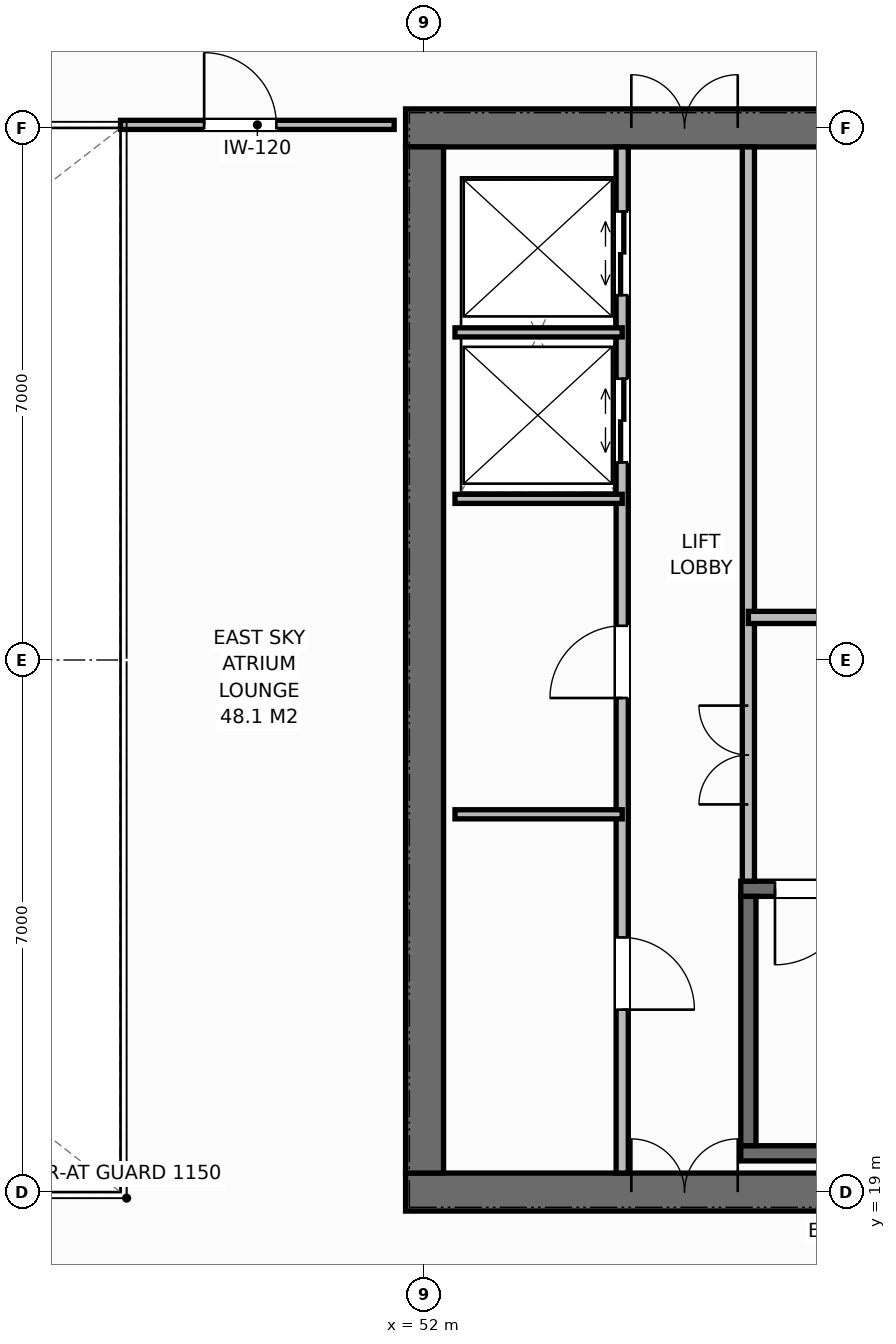
"""IFC4 building model, lengths in metres.
Left out: names, types, materials, properties, quantities, classifications, styles, units other than length and angle.
Written with IfcOpenShell. Run it as: python <this file> out.ifc"""

import sys

from ifc_helpers import new_model, si_unit, direction, frame, frame_2d, origin, place, context, subcontext, project, spatial, rectangle, extrude, element, fill, save


model = new_model("IFC4")
c1 = context("Model", 3, precision=1e-05, world=origin(), true_north=direction((0.0, 1.0)))
c2 = subcontext(c1, "Body", "Model", "MODEL_VIEW")
j1 = project(units=[si_unit("LENGTHUNIT", "METRE"), si_unit("PLANEANGLEUNIT", "RADIAN")], contexts=[c1])
p1 = place(None, origin())
s1 = spatial("IfcSite", under=j1, at=p1, CompositionType="ELEMENT")
p2 = place(p1, origin())
s2 = spatial("IfcBuilding", under=s1, at=p2, CompositionType="ELEMENT")
p3 = place(p2, frame((0.0, 0.0, 255.6)))
s3 = spatial("IfcBuildingStorey", under=s2, at=p3, CompositionType="ELEMENT", Elevation=255.6)
p4 = place(p3, frame((51.75, 19.0, 0.0), z_axis=(0.0, 0.0, 1.0), x_axis=(1.0, 0.0, 0.0)))
e1 = element("IfcWall", 1, at=p4, inside=s3, PredefinedType="SHEAR", context=c2, shape_type="SweptSolid", body=[
    extrude(rectangle(XDim=13.5, YDim=0.5, at=frame_2d((6.75, 0.0))), origin(), (0.0, 0.0, 1.0), 3.8),
])
p5 = place(p4, frame((2.97, 0.0, 0.0)))
e2 = element("IfcOpeningElement", 2, at=p5, cuts=e1, PredefinedType="OPENING", context=c2, shape_type="SweptSolid", body=[
    extrude(rectangle(XDim=1.4, YDim=2.2, at=frame_2d((0.7, 1.1))), frame((0.0, 0.26, 0.0), z_axis=(0.0, -1.0, 0.0), x_axis=(1.0, 0.0, 0.0)), (0.0, 0.0, 1.0), 0.52),
])
p6 = place(p3, frame((51.75, 33.0, 0.0), z_axis=(0.0, 0.0, 1.0), x_axis=(1.0, 0.0, 0.0)))
e3 = element("IfcWall", 3, at=p6, inside=s3, PredefinedType="SHEAR", context=c2, shape_type="SweptSolid", body=[
    extrude(rectangle(XDim=13.5, YDim=0.5, at=frame_2d((6.75, 0.0))), origin(), (0.0, 0.0, 1.0), 3.8),
])
p7 = place(p6, frame((2.97, 0.0, 0.0)))
e4 = element("IfcOpeningElement", 4, at=p7, cuts=e3, PredefinedType="OPENING", context=c2, shape_type="SweptSolid", body=[
    extrude(rectangle(XDim=1.4, YDim=2.2, at=frame_2d((0.7, 1.1))), frame((0.0, 0.26, 0.0), z_axis=(0.0, -1.0, 0.0), x_axis=(1.0, 0.0, 0.0)), (0.0, 0.0, 1.0), 0.52),
])
p8 = place(p6, frame((10.85, 0.0, 0.0)))
e5 = element("IfcOpeningElement", 5, at=p8, cuts=e3, PredefinedType="OPENING", context=c2, shape_type="SweptSolid", body=[
    extrude(rectangle(XDim=0.9, YDim=2.15, at=frame_2d((0.45, 1.075))), frame((0.0, 0.26, 0.0), z_axis=(0.0, -1.0, 0.0), x_axis=(1.0, 0.0, 0.0)), (0.0, 0.0, 1.0), 0.52),
])
p9 = place(p6, frame((6.25, 0.0, 0.0)))
e6 = element("IfcOpeningElement", 6, at=p9, cuts=e3, PredefinedType="OPENING", context=c2, shape_type="SweptSolid", body=[
    extrude(rectangle(XDim=0.95, YDim=2.15, at=frame_2d((0.475, 1.075))), frame((0.0, 0.26, 0.0), z_axis=(0.0, -1.0, 0.0), x_axis=(1.0, 0.0, 0.0)), (0.0, 0.0, 1.0), 0.52),
])
p10 = place(p6, frame((8.7, 0.0, 0.0)))
e7 = element("IfcOpeningElement", 7, at=p10, cuts=e3, PredefinedType="OPENING", context=c2, shape_type="SweptSolid", body=[
    extrude(rectangle(XDim=0.9, YDim=2.15, at=frame_2d((0.45, 1.075))), frame((0.0, 0.26, 0.0), z_axis=(0.0, -1.0, 0.0), x_axis=(1.0, 0.0, 0.0)), (0.0, 0.0, 1.0), 0.52),
])
p11 = place(p3, frame((52.0, 19.25, 0.0), z_axis=(0.0, 0.0, 1.0), x_axis=(0.0, 1.0, 0.0)))
e8 = element("IfcWall", 8, at=p11, inside=s3, PredefinedType="SHEAR", context=c2, shape_type="SweptSolid", body=[
    extrude(rectangle(XDim=13.5, YDim=0.5, at=frame_2d((6.75, 0.0))), origin(), (0.0, 0.0, 1.0), 3.8),
])
p12 = place(p3, frame((56.16, 19.51, 0.0), z_axis=(0.0, 0.0, 1.0), x_axis=(1.0, 0.0, 0.0)))
e9 = element("IfcWall", 9, at=p12, inside=s3, PredefinedType="SHEAR", context=c2, shape_type="SweptSolid", body=[
    extrude(rectangle(XDim=8.43, YDim=0.2, at=frame_2d((4.215, 0.0))), origin(), (0.0, 0.0, 1.0), 3.8),
])
p13 = place(p3, frame((56.16, 22.99, 0.0), z_axis=(0.0, 0.0, 1.0), x_axis=(1.0, 0.0, 0.0)))
e10 = element("IfcWall", 10, at=p13, inside=s3, PredefinedType="SHEAR", context=c2, shape_type="SweptSolid", body=[
    extrude(rectangle(XDim=8.43, YDim=0.2, at=frame_2d((4.215, 0.0))), origin(), (0.0, 0.0, 1.0), 3.8),
])
p14 = place(p13, frame((0.45, 0.0, 0.0)))
e11 = element("IfcOpeningElement", 11, at=p14, cuts=e10, PredefinedType="OPENING", context=c2, shape_type="SweptSolid", body=[
    extrude(rectangle(XDim=1.0, YDim=2.15, at=frame_2d((0.5, 1.075))), frame((0.0, 0.11, 0.0), z_axis=(0.0, -1.0, 0.0), x_axis=(1.0, 0.0, 0.0)), (0.0, 0.0, 1.0), 0.22),
])
p15 = place(p3, frame((56.26, 19.61, 0.0), z_axis=(0.0, 0.0, 1.0), x_axis=(0.0, 1.0, 0.0)))
e12 = element("IfcWall", 12, at=p15, inside=s3, PredefinedType="SHEAR", context=c2, shape_type="SweptSolid", body=[
    extrude(rectangle(XDim=3.28, YDim=0.2, at=frame_2d((1.64, 0.0))), origin(), (0.0, 0.0, 1.0), 3.8),
])
p16 = place(p3, frame((54.6, 19.25, 0.0), z_axis=(0.0, 0.0, 1.0), x_axis=(0.0, 1.0, 0.0)))
e13 = element("IfcWall", 13, at=p16, inside=s3, PredefinedType="STANDARD", context=c2, shape_type="SweptSolid", body=[
    extrude(rectangle(XDim=13.5, YDim=0.16, at=frame_2d((6.75, 0.0))), origin(), (0.0, 0.0, 1.0), 3.588),
])
p17 = place(p16, frame((2.15, 0.0, 0.0)))
e14 = element("IfcOpeningElement", 14, at=p17, cuts=e13, PredefinedType="OPENING", context=c2, shape_type="SweptSolid", body=[
    extrude(rectangle(XDim=0.95, YDim=2.15, at=frame_2d((0.475, 1.075))), frame((0.0, 0.09, 0.0), z_axis=(0.0, -1.0, 0.0), x_axis=(1.0, 0.0, 0.0)), (0.0, 0.0, 1.0), 0.18),
])
p18 = place(p16, frame((6.25, 0.0, 0.0)))
e15 = element("IfcOpeningElement", 15, at=p18, cuts=e13, PredefinedType="OPENING", context=c2, shape_type="SweptSolid", body=[
    extrude(rectangle(XDim=0.95, YDim=2.15, at=frame_2d((0.475, 1.075))), frame((0.0, 0.09, 0.0), z_axis=(0.0, -1.0, 0.0), x_axis=(1.0, 0.0, 0.0)), (0.0, 0.0, 1.0), 0.18),
])
p19 = place(p16, frame((9.35, 0.0, 0.0)))
e16 = element("IfcOpeningElement", 16, at=p19, cuts=e13, PredefinedType="OPENING", context=c2, shape_type="SweptSolid", body=[
    extrude(rectangle(XDim=1.1, YDim=2.2, at=frame_2d((0.55, 1.1))), frame((0.0, 0.09, 0.0), z_axis=(0.0, -1.0, 0.0), x_axis=(1.0, 0.0, 0.0)), (0.0, 0.0, 1.0), 0.18),
])
p20 = place(p16, frame((11.55, 0.0, 0.0)))
e17 = element("IfcOpeningElement", 17, at=p20, cuts=e13, PredefinedType="OPENING", context=c2, shape_type="SweptSolid", body=[
    extrude(rectangle(XDim=1.1, YDim=2.2, at=frame_2d((0.55, 1.1))), frame((0.0, 0.09, 0.0), z_axis=(0.0, -1.0, 0.0), x_axis=(1.0, 0.0, 0.0)), (0.0, 0.0, 1.0), 0.18),
])
p21 = place(p3, frame((56.26, 23.09, 0.0), z_axis=(0.0, 0.0, 1.0), x_axis=(0.0, 1.0, 0.0)))
e18 = element("IfcWall", 18, at=p21, inside=s3, PredefinedType="STANDARD", context=c2, shape_type="SweptSolid", body=[
    extrude(rectangle(XDim=9.66, YDim=0.16, at=frame_2d((4.83, 0.0))), origin(), (0.0, 0.0, 1.0), 3.588),
])
p22 = place(p21, frame((1.01, 0.0, 0.0)))
e19 = element("IfcOpeningElement", 19, at=p22, cuts=e18, PredefinedType="OPENING", context=c2, shape_type="SweptSolid", body=[
    extrude(rectangle(XDim=1.3, YDim=2.2, at=frame_2d((0.65, 1.1))), frame((0.0, 0.09, 0.0), z_axis=(0.0, -1.0, 0.0), x_axis=(1.0, 0.0, 0.0)), (0.0, 0.0, 1.0), 0.18),
])
for number, where, z_axis, x_axis in (
    (20, (52.4, 23.97, 0.0), (0.0, 0.0, 1.0), (1.0, 0.0, 0.0)),
    (21, (52.4, 28.12, 0.0), (0.0, 0.0, 1.0), (1.0, 0.0, 0.0)),
    (22, (52.4, 30.31, 0.0), (0.0, 0.0, 1.0), (1.0, 0.0, 0.0)),
):
    element("IfcWall", number, at=place(p3, frame(where, z_axis=z_axis, x_axis=x_axis)), inside=s3, PredefinedType="PARTITIONING", context=c2, shape_type="SweptSolid", body=[
        extrude(rectangle(XDim=2.2, YDim=0.12, at=frame_2d((1.1, 0.0))), origin(), (0.0, 0.0, 1.0), 3.588),
    ])
p23 = place(p3, frame((56.26, 26.56, 0.0), z_axis=(0.0, 0.0, 1.0), x_axis=(1.0, 0.0, 0.0)))
e23 = element("IfcWall", 23, at=p23, inside=s3, PredefinedType="STANDARD", context=c2, shape_type="SweptSolid", body=[
    extrude(rectangle(XDim=8.34, YDim=0.16, at=frame_2d((4.17, 0.0))), origin(), (0.0, 0.0, 1.0), 3.588),
])
p24 = place(p3, frame((48.0, 33.04, 0.0), z_axis=(0.0, 0.0, 1.0), x_axis=(1.0, 0.0, 0.0)))
e24 = element("IfcWall", 24, at=p24, inside=s3, PredefinedType="PARTITIONING", context=c2, shape_type="SweptSolid", body=[
    extrude(rectangle(XDim=3.6, YDim=0.12, at=frame_2d((1.8, 0.0))), origin(), (0.0, 0.0, 1.0), 3.328),
])
p25 = place(p24, frame((1.1, 0.0, 0.0)))
e25 = element("IfcOpeningElement", 25, at=p25, cuts=e24, PredefinedType="OPENING", context=c2, shape_type="SweptSolid", body=[
    extrude(rectangle(XDim=0.95, YDim=2.15, at=frame_2d((0.475, 1.075))), frame((0.0, 0.07, 0.0), z_axis=(0.0, -1.0, 0.0), x_axis=(1.0, 0.0, 0.0)), (0.0, 0.0, 1.0), 0.14),
])
p26 = place(p5, origin())
e26 = element("IfcDoor", 26, at=p26, inside=s3, OperationType="DOUBLE_DOOR_SINGLE_SWING", PredefinedType="DOOR", context=c2, shape_type="SweptSolid", body=[
    extrude(rectangle(XDim=1.4, YDim=2.2, at=frame_2d((0.7, 1.1))), frame((0.0, 0.075, 0.0), z_axis=(0.0, -1.0, 0.0), x_axis=(1.0, 0.0, 0.0)), (0.0, 0.0, 1.0), 0.05),
])
fill(e2, e26)
p27 = place(p7, origin())
e27 = element("IfcDoor", 27, at=p27, inside=s3, OperationType="DOUBLE_DOOR_SINGLE_SWING", PredefinedType="DOOR", context=c2, shape_type="SweptSolid", body=[
    extrude(rectangle(XDim=1.4, YDim=2.2, at=frame_2d((0.7, 1.1))), frame((0.0, -0.025, 0.0), z_axis=(0.0, -1.0, 0.0), x_axis=(1.0, 0.0, 0.0)), (0.0, 0.0, 1.0), 0.05),
])
fill(e4, e27)
p28 = place(p17, origin())
e28 = element("IfcDoor", 28, at=p28, inside=s3, OperationType="SINGLE_SWING_RIGHT", PredefinedType="DOOR", context=c2, shape_type="SweptSolid", body=[
    extrude(rectangle(XDim=0.95, YDim=2.15, at=frame_2d((0.475, 1.075))), frame((0.0, 0.025, 0.0), z_axis=(0.0, -1.0, 0.0), x_axis=(1.0, 0.0, 0.0)), (0.0, 0.0, 1.0), 0.05),
])
fill(e14, e28)
p29 = place(p18, origin())
e29 = element("IfcDoor", 29, at=p29, inside=s3, OperationType="SINGLE_SWING_LEFT", PredefinedType="DOOR", context=c2, shape_type="SweptSolid", body=[
    extrude(rectangle(XDim=0.95, YDim=2.15, at=frame_2d((0.475, 1.075))), frame((0.0, 0.025, 0.0), z_axis=(0.0, -1.0, 0.0), x_axis=(1.0, 0.0, 0.0)), (0.0, 0.0, 1.0), 0.05),
])
fill(e15, e29)
p30 = place(p19, origin())
e30 = element("IfcDoor", 30, at=p30, inside=s3, OperationType="DOUBLE_DOOR_SLIDING", PredefinedType="DOOR", context=c2, shape_type="SweptSolid", body=[
    extrude(rectangle(XDim=1.1, YDim=2.2, at=frame_2d((0.55, 1.1))), frame((0.0, 0.025, 0.0), z_axis=(0.0, -1.0, 0.0), x_axis=(1.0, 0.0, 0.0)), (0.0, 0.0, 1.0), 0.05),
])
fill(e16, e30)
p31 = place(p20, origin())
e31 = element("IfcDoor", 31, at=p31, inside=s3, OperationType="DOUBLE_DOOR_SLIDING", PredefinedType="DOOR", context=c2, shape_type="SweptSolid", body=[
    extrude(rectangle(XDim=1.1, YDim=2.2, at=frame_2d((0.55, 1.1))), frame((0.0, 0.025, 0.0), z_axis=(0.0, -1.0, 0.0), x_axis=(1.0, 0.0, 0.0)), (0.0, 0.0, 1.0), 0.05),
])
fill(e17, e31)
p32 = place(p14, origin())
e32 = element("IfcDoor", 32, at=p32, inside=s3, OperationType="SINGLE_SWING_RIGHT", PredefinedType="DOOR", context=c2, shape_type="SweptSolid", body=[
    extrude(rectangle(XDim=1.0, YDim=2.15, at=frame_2d((0.5, 1.075))), frame((0.0, 0.025, 0.0), z_axis=(0.0, -1.0, 0.0), x_axis=(1.0, 0.0, 0.0)), (0.0, 0.0, 1.0), 0.05),
])
fill(e11, e32)
p33 = place(p22, origin())
e33 = element("IfcDoor", 33, at=p33, inside=s3, OperationType="DOUBLE_DOOR_SINGLE_SWING", PredefinedType="DOOR", context=c2, shape_type="SweptSolid", body=[
    extrude(rectangle(XDim=1.3, YDim=2.2, at=frame_2d((0.65, 1.1))), frame((0.0, 0.025, 0.0), z_axis=(0.0, -1.0, 0.0), x_axis=(1.0, 0.0, 0.0)), (0.0, 0.0, 1.0), 0.05),
])
fill(e19, e33)
p34 = place(p25, origin())
e34 = element("IfcDoor", 34, at=p34, inside=s3, OperationType="SINGLE_SWING_LEFT", PredefinedType="DOOR", context=c2, shape_type="SweptSolid", body=[
    extrude(rectangle(XDim=0.95, YDim=2.15, at=frame_2d((0.475, 1.075))), frame((0.0, 0.025, 0.0), z_axis=(0.0, -1.0, 0.0), x_axis=(1.0, 0.0, 0.0)), (0.0, 0.0, 1.0), 0.05),
])
fill(e25, e34)
save(model, sys.argv[1])
